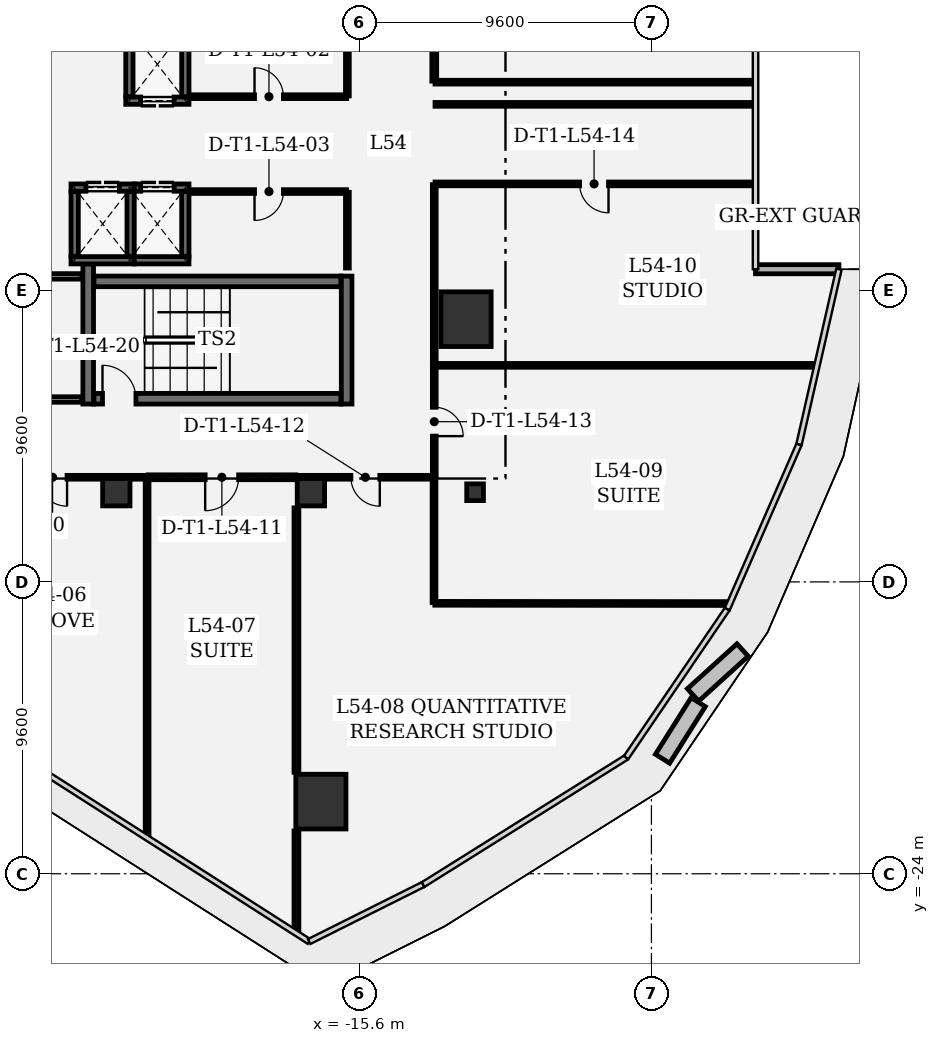
"""IFC4 building model, lengths in metres.
Left out: names, types, materials, properties, quantities, classifications, styles, units other than length and angle.
Written with IfcOpenShell. Run it as: python <this file> out.ifc"""

import sys

from ifc_helpers import new_model, si_unit, direction, frame, frame_2d, origin, origin_2d, place, context, subcontext, project, spatial, rectangle, extrude, element, fill, save


model = new_model("IFC4")
c1 = context("Model", 3, precision=1e-05, world=origin(), true_north=direction((0.0, 1.0)))
c2 = subcontext(c1, "Body", "Model", "MODEL_VIEW")
j1 = project(units=[si_unit("LENGTHUNIT", "METRE"), si_unit("PLANEANGLEUNIT", "RADIAN")], contexts=[c1])
p1 = place(None, origin())
s1 = spatial("IfcSite", under=j1, at=p1, CompositionType="ELEMENT")
p2 = place(p1, origin())
s2 = spatial("IfcBuilding", under=s1, at=p2, CompositionType="ELEMENT")
p3 = place(p2, frame((0.0, 0.0, 233.4)))
s3 = spatial("IfcBuildingStorey", under=s2, at=p3, CompositionType="ELEMENT", Elevation=233.4)
for number, where, z_axis, x_axis in (
    (1, (-16.872, -21.627, 0.0), (0.0, 0.0, 1.0), (1.0, 0.0, 0.0)),
    (2, (-12.097, -5.758, 0.0), (0.0, 0.0, 1.0), (1.0, 0.0, 0.0)),
):
    element("IfcColumn", number, at=place(p3, frame(where, z_axis=z_axis, x_axis=x_axis)), inside=s3, PredefinedType="COLUMN", context=c2, shape_type="SweptSolid", body=[
        extrude(rectangle(XDim=1.65, YDim=1.8, at=origin_2d()), origin(), (0.0, 0.0, 1.0), 4.05),
    ])
for number, where, z_axis, x_axis in (
    (3, (-17.2, -11.45, 0.0), (0.0, 0.0, 1.0), (1.0, 0.0, 0.0)),
    (4, (-23.6, -11.45, 0.0), (0.0, 0.0, 1.0), (1.0, 0.0, 0.0)),
):
    element("IfcColumn", number, at=place(p3, frame(where, z_axis=z_axis, x_axis=x_axis)), inside=s3, PredefinedType="COLUMN", context=c2, shape_type="SweptSolid", body=[
        extrude(rectangle(XDim=0.9, YDim=0.9, at=origin_2d()), origin(), (0.0, 0.0, 1.0), 4.05),
    ])
p4 = place(p3, frame((-11.8, -11.45, 0.0), z_axis=(0.0, 0.0, 1.0), x_axis=(1.0, 0.0, 0.0)))
e5 = element("IfcColumn", 5, at=p4, inside=s3, PredefinedType="COLUMN", context=c2, shape_type="SweptSolid", body=[
    extrude(rectangle(XDim=0.55, YDim=0.55, at=origin_2d()), origin(), (0.0, 0.0, 1.0), 4.05),
])
p5 = place(p3, frame((0.168, -4.115, 0.0), z_axis=(0.0, 0.0, 1.0), x_axis=(-1.0, 0.0, 0.0)))
e6 = element("IfcWall", 6, at=p5, inside=s3, PredefinedType="SOLIDWALL", context=c2, shape_type="SweptSolid", body=[
    extrude(rectangle(XDim=2.743, YDim=0.3, at=frame_2d((1.372, 0.0))), origin(), (0.0, 0.0, 1.0), 3.78),
])
p6 = place(p3, frame((-24.525, -3.94, 0.0), z_axis=(0.0, 0.0, 1.0), x_axis=(0.0, -1.0, 0.0)))
e7 = element("IfcWall", 7, at=p6, inside=s3, PredefinedType="SHEAR", context=c2, shape_type="SweptSolid", body=[
    extrude(rectangle(XDim=4.61, YDim=0.35, at=frame_2d((2.305, 0.0))), origin(), (0.0, 0.0, 1.0), 3.78),
])
p7 = place(p3, frame((-16.025, -8.55, 0.0), z_axis=(0.0, 0.0, 1.0), x_axis=(0.0, 1.0, 0.0)))
e8 = element("IfcWall", 8, at=p7, inside=s3, PredefinedType="SHEAR", context=c2, shape_type="SweptSolid", body=[
    extrude(rectangle(XDim=4.21, YDim=0.35, at=frame_2d((2.105, 0.0))), origin(), (0.0, 0.0, 1.0), 3.78),
])
p8 = place(p3, frame((-24.335, -8.375, 0.0), z_axis=(0.0, 0.0, 1.0), x_axis=(1.0, 0.0, 0.0)))
e9 = element("IfcWall", 9, at=p8, inside=s3, PredefinedType="SHEAR", context=c2, shape_type="SweptSolid", body=[
    extrude(rectangle(XDim=8.12, YDim=0.35, at=frame_2d((4.06, 0.0))), origin(), (0.0, 0.0, 1.0), 3.78),
])
p9 = place(p8, frame((0.28, 0.0, 0.0)))
e10 = element("IfcOpeningElement", 10, at=p9, cuts=e9, PredefinedType="OPENING", context=c2, shape_type="SweptSolid", body=[
    extrude(rectangle(XDim=1.1, YDim=2.2, at=frame_2d((0.55, 1.1))), frame((0.0, 0.185, 0.0), z_axis=(0.0, -1.0, 0.0), x_axis=(1.0, 0.0, 0.0)), (0.0, 0.0, 1.0), 0.37),
])
p10 = place(p3, frame((-16.215, -4.515, 0.0), z_axis=(0.0, 0.0, 1.0), x_axis=(-1.0, 0.0, 0.0)))
e11 = element("IfcWall", 11, at=p10, inside=s3, PredefinedType="SHEAR", context=c2, shape_type="SweptSolid", body=[
    extrude(rectangle(XDim=8.12, YDim=0.35, at=frame_2d((4.06, 0.0))), origin(), (0.0, 0.0, 1.0), 3.78),
])
p11 = place(p3, frame((-21.21, 1.43, 0.0), z_axis=(0.0, 0.0, 1.0), x_axis=(-1.0, 0.0, 0.0)))
e12 = element("IfcWall", 12, at=p11, inside=s3, PredefinedType="SHEAR", context=c2, shape_type="SweptSolid", body=[
    extrude(rectangle(XDim=2.08, YDim=0.24, at=frame_2d((1.04, 0.0))), origin(), (0.0, 0.0, 1.0), 3.78),
])
p12 = place(p11, frame((0.49, 0.0, 0.0)))
e13 = element("IfcOpeningElement", 13, at=p12, cuts=e12, PredefinedType="OPENING", context=c2, shape_type="SweptSolid", body=[
    extrude(rectangle(XDim=1.1, YDim=2.2, at=frame_2d((0.55, 1.1))), frame((0.0, 0.13, 0.0), z_axis=(0.0, -1.0, 0.0), x_axis=(1.0, 0.0, 0.0)), (0.0, 0.0, 1.0), 0.26),
])
for number, where, z_axis, x_axis in (
    (14, (-23.17, 1.562, 0.0), (0.0, 0.0, 1.0), (0.0, 1.0, 0.0)),
    (15, (-21.33, 3.688, 0.0), (0.0, 0.0, 1.0), (0.0, -1.0, 0.0)),
):
    element("IfcWall", number, at=place(p3, frame(where, z_axis=z_axis, x_axis=x_axis)), inside=s3, PredefinedType="SHEAR", context=c2, shape_type="SweptSolid", body=[
        extrude(rectangle(XDim=2.126, YDim=0.24, at=frame_2d((1.063, 0.0))), origin(), (0.0, 0.0, 1.0), 3.78),
    ])
p13 = place(p3, frame((-23.01, -3.82, 0.0), z_axis=(0.0, 0.0, 1.0), x_axis=(-1.0, 0.0, 0.0)))
e16 = element("IfcWall", 16, at=p13, inside=s3, PredefinedType="SHEAR", context=c2, shape_type="SweptSolid", body=[
    extrude(rectangle(XDim=2.08, YDim=0.24, at=frame_2d((1.04, 0.0))), origin(), (0.0, 0.0, 1.0), 3.78),
])
p14 = place(p3, frame((-25.09, -1.43, 0.0), z_axis=(0.0, 0.0, 1.0), x_axis=(1.0, 0.0, 0.0)))
e17 = element("IfcWall", 17, at=p14, inside=s3, PredefinedType="SHEAR", context=c2, shape_type="SweptSolid", body=[
    extrude(rectangle(XDim=2.08, YDim=0.24, at=frame_2d((1.04, 0.0))), origin(), (0.0, 0.0, 1.0), 3.78),
])
p15 = place(p14, frame((0.49, 0.0, 0.0)))
e18 = element("IfcOpeningElement", 18, at=p15, cuts=e17, PredefinedType="OPENING", context=c2, shape_type="SweptSolid", body=[
    extrude(rectangle(XDim=1.1, YDim=2.2, at=frame_2d((0.55, 1.1))), frame((0.0, 0.13, 0.0), z_axis=(0.0, -1.0, 0.0), x_axis=(1.0, 0.0, 0.0)), (0.0, 0.0, 1.0), 0.26),
])
for number, where, z_axis, x_axis in (
    (19, (-24.97, -3.688, 0.0), (0.0, 0.0, 1.0), (0.0, 1.0, 0.0)),
    (20, (-23.13, -1.562, 0.0), (0.0, 0.0, 1.0), (0.0, -1.0, 0.0)),
):
    element("IfcWall", number, at=place(p3, frame(where, z_axis=z_axis, x_axis=x_axis)), inside=s3, PredefinedType="SHEAR", context=c2, shape_type="SweptSolid", body=[
        extrude(rectangle(XDim=2.126, YDim=0.24, at=frame_2d((1.063, 0.0))), origin(), (0.0, 0.0, 1.0), 3.78),
    ])
p16 = place(p3, frame((-21.21, -3.82, 0.0), z_axis=(0.0, 0.0, 1.0), x_axis=(-1.0, 0.0, 0.0)))
e21 = element("IfcWall", 21, at=p16, inside=s3, PredefinedType="SHEAR", context=c2, shape_type="SweptSolid", body=[
    extrude(rectangle(XDim=1.8, YDim=0.24, at=frame_2d((0.9, 0.0))), origin(), (0.0, 0.0, 1.0), 3.78),
])
p17 = place(p3, frame((-23.01, -1.43, 0.0), z_axis=(0.0, 0.0, 1.0), x_axis=(1.0, 0.0, 0.0)))
e22 = element("IfcWall", 22, at=p17, inside=s3, PredefinedType="SHEAR", context=c2, shape_type="SweptSolid", body=[
    extrude(rectangle(XDim=1.8, YDim=0.24, at=frame_2d((0.9, 0.0))), origin(), (0.0, 0.0, 1.0), 3.78),
])
p18 = place(p17, frame((0.21, 0.0, 0.0)))
e23 = element("IfcOpeningElement", 23, at=p18, cuts=e22, PredefinedType="OPENING", context=c2, shape_type="SweptSolid", body=[
    extrude(rectangle(XDim=1.1, YDim=2.2, at=frame_2d((0.55, 1.1))), frame((0.0, 0.13, 0.0), z_axis=(0.0, -1.0, 0.0), x_axis=(1.0, 0.0, 0.0)), (0.0, 0.0, 1.0), 0.26),
])
p19 = place(p3, frame((-21.33, -1.562, 0.0), z_axis=(0.0, 0.0, 1.0), x_axis=(0.0, -1.0, 0.0)))
e24 = element("IfcWall", 24, at=p19, inside=s3, PredefinedType="SHEAR", context=c2, shape_type="SweptSolid", body=[
    extrude(rectangle(XDim=2.126, YDim=0.24, at=frame_2d((1.063, 0.0))), origin(), (0.0, 0.0, 1.0), 3.78),
])
p20 = place(p3, frame((-28.355, -8.4, 0.0), z_axis=(0.0, 0.0, 1.0), x_axis=(1.0, 0.0, 0.0)))
e25 = element("IfcWall", 25, at=p20, inside=s3, PredefinedType="PARTITIONING", context=c2, shape_type="SweptSolid", body=[
    extrude(rectangle(XDim=3.622, YDim=0.18, at=frame_2d((1.811, 0.0))), origin(), (0.0, 0.0, 1.0), 3.78),
])
p21 = place(p20, frame((1.311, 0.0, 0.0)))
e26 = element("IfcOpeningElement", 26, at=p21, cuts=e25, PredefinedType="OPENING", context=c2, shape_type="SweptSolid", body=[
    extrude(rectangle(XDim=1.0, YDim=2.15, at=frame_2d((0.5, 1.075))), frame((0.0, 0.1, 0.0), z_axis=(0.0, -1.0, 0.0), x_axis=(1.0, 0.0, 0.0)), (0.0, 0.0, 1.0), 0.2),
])
p22 = place(p3, frame((-24.733, -4.35, 0.0), z_axis=(0.0, 0.0, 1.0), x_axis=(-1.0, 0.0, 0.0)))
e27 = element("IfcWall", 27, at=p22, inside=s3, PredefinedType="PARTITIONING", context=c2, shape_type="SweptSolid", body=[
    extrude(rectangle(XDim=3.622, YDim=0.18, at=frame_2d((1.811, 0.0))), origin(), (0.0, 0.0, 1.0), 3.78),
])
p23 = place(p3, frame((-21.134, 1.56, 0.0), z_axis=(0.0, 0.0, 1.0), x_axis=(1.0, 0.0, 0.0)))
e28 = element("IfcWall", 28, at=p23, inside=s3, PredefinedType="PARTITIONING", context=c2, shape_type="SweptSolid", body=[
    extrude(rectangle(XDim=5.109, YDim=0.125, at=frame_2d((2.554, 0.0))), origin(), (0.0, 0.0, 1.0), 3.78),
])
p24 = place(p23, frame((2.079, 0.0, 0.0)))
e29 = element("IfcOpeningElement", 29, at=p24, cuts=e28, PredefinedType="OPENING", context=c2, shape_type="SweptSolid", body=[
    extrude(rectangle(XDim=0.95, YDim=2.15, at=frame_2d((0.475, 1.075))), frame((0.0, 0.073, 0.0), z_axis=(0.0, -1.0, 0.0), x_axis=(1.0, 0.0, 0.0)), (0.0, 0.0, 1.0), 0.145),
])
p25 = place(p3, frame((-16.0, 1.585, 0.0), z_axis=(0.0, 0.0, 1.0), x_axis=(0.0, 1.0, 0.0)))
e30 = element("IfcWall", 30, at=p25, inside=s3, PredefinedType="PARTITIONING", context=c2, shape_type="SweptSolid", body=[
    extrude(rectangle(XDim=2.302, YDim=0.125, at=frame_2d((1.151, 0.0))), origin(), (0.0, 0.0, 1.0), 3.78),
])
p26 = place(p3, frame((-16.0, -4.075, 0.0), z_axis=(0.0, 0.0, 1.0), x_axis=(0.0, 1.0, 0.0)))
e31 = element("IfcWall", 31, at=p26, inside=s3, PredefinedType="PARTITIONING", context=c2, shape_type="SweptSolid", body=[
    extrude(rectangle(XDim=2.49, YDim=0.125, at=frame_2d((1.245, 0.0))), origin(), (0.0, 0.0, 1.0), 3.78),
])
p27 = place(p3, frame((-16.025, -1.56, 0.0), z_axis=(0.0, 0.0, 1.0), x_axis=(-1.0, 0.0, 0.0)))
e32 = element("IfcWall", 32, at=p27, inside=s3, PredefinedType="PARTITIONING", context=c2, shape_type="SweptSolid", body=[
    extrude(rectangle(XDim=5.109, YDim=0.125, at=frame_2d((2.554, 0.0))), origin(), (0.0, 0.0, 1.0), 3.78),
])
p28 = place(p27, frame((2.079, 0.0, 0.0)))
e33 = element("IfcOpeningElement", 33, at=p28, cuts=e32, PredefinedType="OPENING", context=c2, shape_type="SweptSolid", body=[
    extrude(rectangle(XDim=0.95, YDim=2.15, at=frame_2d((0.475, 1.075))), frame((0.0, 0.073, 0.0), z_axis=(0.0, -1.0, 0.0), x_axis=(1.0, 0.0, 0.0)), (0.0, 0.0, 1.0), 0.145),
])
p29 = place(p3, frame((-22.612, -10.958, 0.0), z_axis=(0.0, 0.0, 1.0), x_axis=(-1.0, 0.0, 0.0)))
e34 = element("IfcWall", 34, at=p29, inside=s3, PredefinedType="PARTITIONING", context=c2, shape_type="SweptSolid", body=[
    extrude(rectangle(XDim=6.166, YDim=0.125, at=frame_2d((3.083, 0.0))), origin(), (0.0, 0.0, 1.0), 3.78),
])
p30 = place(p29, frame((2.608, 0.0, 0.0)))
e35 = element("IfcOpeningElement", 35, at=p30, cuts=e34, PredefinedType="OPENING", context=c2, shape_type="SweptSolid", body=[
    extrude(rectangle(XDim=0.95, YDim=2.15, at=frame_2d((0.475, 1.075))), frame((0.0, 0.073, 0.0), z_axis=(0.0, -1.0, 0.0), x_axis=(1.0, 0.0, 0.0)), (0.0, 0.0, 1.0), 0.145),
])
p31 = place(p3, frame((-22.587, -22.742, 0.0), z_axis=(0.0, 0.0, 1.0), x_axis=(0.0, 1.0, 0.0)))
e36 = element("IfcWall", 36, at=p31, inside=s3, PredefinedType="PARTITIONING", context=c2, shape_type="SweptSolid", body=[
    extrude(rectangle(XDim=11.76, YDim=0.125, at=frame_2d((5.88, 0.0))), origin(), (0.0, 0.0, 1.0), 2.977),
])
p32 = place(p3, frame((-17.676, -25.881, 0.0), z_axis=(0.0, 0.0, 1.0), x_axis=(0.0, 1.0, 0.0)))
e37 = element("IfcWall", 37, at=p32, inside=s3, PredefinedType="PARTITIONING", context=c2, shape_type="SweptSolid", body=[
    extrude(rectangle(XDim=3.289, YDim=0.16, at=frame_2d((1.645, 0.0))), origin(), (0.0, 0.0, 1.0), 3.78),
])
p33 = place(p3, frame((-17.676, -20.662, 0.0), z_axis=(0.0, 0.0, 1.0), x_axis=(0.0, 1.0, 0.0)))
e38 = element("IfcWall", 38, at=p33, inside=s3, PredefinedType="PARTITIONING", context=c2, shape_type="SweptSolid", body=[
    extrude(rectangle(XDim=8.697, YDim=0.16, at=frame_2d((4.349, 0.0))), origin(), (0.0, 0.0, 1.0), 2.977),
])
p34 = place(p3, frame((-17.701, -10.958, 0.0), z_axis=(0.0, 0.0, 1.0), x_axis=(-1.0, 0.0, 0.0)))
e39 = element("IfcWall", 39, at=p34, inside=s3, PredefinedType="PARTITIONING", context=c2, shape_type="SweptSolid", body=[
    extrude(rectangle(XDim=4.853, YDim=0.16, at=frame_2d((2.427, 0.0))), origin(), (0.0, 0.0, 1.0), 3.344),
])
p35 = place(p34, frame((1.877, 0.0, 0.0)))
e40 = element("IfcOpeningElement", 40, at=p35, cuts=e39, PredefinedType="OPENING", context=c2, shape_type="SweptSolid", body=[
    extrude(rectangle(XDim=1.1, YDim=2.15, at=frame_2d((0.55, 1.075))), frame((0.0, 0.09, 0.0), z_axis=(0.0, -1.0, 0.0), x_axis=(1.0, 0.0, 0.0)), (0.0, 0.0, 1.0), 0.18),
])
p36 = place(p3, frame((-3.506, -15.112, 0.0), z_axis=(0.0, 0.0, 1.0), x_axis=(-0.999999690456, 0.000786821757, 0.0)))
e41 = element("IfcWall", 41, at=p36, inside=s3, PredefinedType="PARTITIONING", context=c2, shape_type="SweptSolid", body=[
    extrude(rectangle(XDim=9.619, YDim=0.125, at=frame_2d((4.81, 0.0))), origin(), (0.0, 0.0, 1.0), 3.78),
])
p37 = place(p3, frame((-13.15, -10.983, 0.0), z_axis=(0.0, 0.0, 1.0), x_axis=(0.0, -1.0, 0.0)))
e42 = element("IfcWall", 42, at=p37, inside=s3, PredefinedType="PARTITIONING", context=c2, shape_type="SweptSolid", body=[
    extrude(rectangle(XDim=4.096, YDim=0.125, at=frame_2d((2.048, 0.0))), origin(), (0.0, 0.0, 1.0), 3.78),
])
p38 = place(p3, frame((-13.175, -10.958, 0.0), z_axis=(0.0, 0.0, 1.0), x_axis=(-1.0, 0.0, 0.0)))
e43 = element("IfcWall", 43, at=p38, inside=s3, PredefinedType="PARTITIONING", context=c2, shape_type="SweptSolid", body=[
    extrude(rectangle(XDim=4.468, YDim=0.125, at=frame_2d((2.234, 0.0))), origin(), (0.0, 0.0, 1.0), 3.344),
])
p39 = place(p38, frame((1.759, 0.0, 0.0)))
e44 = element("IfcOpeningElement", 44, at=p39, cuts=e43, PredefinedType="OPENING", context=c2, shape_type="SweptSolid", body=[
    extrude(rectangle(XDim=0.95, YDim=2.15, at=frame_2d((0.475, 1.075))), frame((0.0, 0.073, 0.0), z_axis=(0.0, -1.0, 0.0), x_axis=(1.0, 0.0, 0.0)), (0.0, 0.0, 1.0), 0.145),
])
p40 = place(p3, frame((-0.632, -7.277, 0.0), z_axis=(0.0, 0.0, 1.0), x_axis=(-1.0, 0.0, 0.0)))
e45 = element("IfcWall", 45, at=p40, inside=s3, PredefinedType="PARTITIONING", context=c2, shape_type="SweptSolid", body=[
    extrude(rectangle(XDim=12.485, YDim=0.125, at=frame_2d((6.242, 0.0))), origin(), (0.0, 0.0, 1.0), 3.78),
])
p41 = place(p3, frame((-13.142, -7.302, 0.0), z_axis=(0.0, 0.0, 1.0), x_axis=(0.0, -1.0, 0.0)))
e46 = element("IfcWall", 46, at=p41, inside=s3, PredefinedType="PARTITIONING", context=c2, shape_type="SweptSolid", body=[
    extrude(rectangle(XDim=3.656, YDim=0.125, at=frame_2d((1.828, 0.0))), origin(), (0.0, 0.0, 1.0), 3.0),
])
p42 = place(p41, frame((1.353, 0.0, 0.0)))
e47 = element("IfcOpeningElement", 47, at=p42, cuts=e46, PredefinedType="OPENING", context=c2, shape_type="SweptSolid", body=[
    extrude(rectangle(XDim=0.95, YDim=2.15, at=frame_2d((0.475, 1.075))), frame((0.0, 0.073, 0.0), z_axis=(0.0, -1.0, 0.0), x_axis=(1.0, 0.0, 0.0)), (0.0, 0.0, 1.0), 0.145),
])
for number, where, z_axis, x_axis in (
    (48, (-2.656, 2.038, 0.0), (0.0, 0.0, 1.0), (-1.0, 0.0, 0.0)),
    (49, (-2.656, 1.308, 0.0), (0.0, 0.0, 1.0), (-1.0, 0.0, 0.0)),
):
    element("IfcWall", number, at=place(p3, frame(where, z_axis=z_axis, x_axis=x_axis)), inside=s3, PredefinedType="PARTITIONING", context=c2, shape_type="SweptSolid", body=[
        extrude(rectangle(XDim=10.462, YDim=0.125, at=frame_2d((5.231, 0.0))), origin(), (0.0, 0.0, 1.0), 3.78),
    ])
p43 = place(p3, frame((-2.656, -1.308, 0.0), z_axis=(0.0, 0.0, 1.0), x_axis=(-1.0, 0.0, 0.0)))
e50 = element("IfcWall", 50, at=p43, inside=s3, PredefinedType="PARTITIONING", context=c2, shape_type="SweptSolid", body=[
    extrude(rectangle(XDim=10.462, YDim=0.125, at=frame_2d((5.231, 0.0))), origin(), (0.0, 0.0, 1.0), 3.78),
])
p44 = place(p43, frame((4.756, 0.0, 0.0)))
e51 = element("IfcOpeningElement", 51, at=p44, cuts=e50, PredefinedType="OPENING", context=c2, shape_type="SweptSolid", body=[
    extrude(rectangle(XDim=0.95, YDim=2.15, at=frame_2d((0.475, 1.075))), frame((0.0, 0.073, 0.0), z_axis=(0.0, -1.0, 0.0), x_axis=(1.0, 0.0, 0.0)), (0.0, 0.0, 1.0), 0.145),
])
p45 = place(p3, frame((-13.142, -1.333, 0.0), z_axis=(0.0, 0.0, 1.0), x_axis=(0.0, -1.0, 0.0)))
e52 = element("IfcWall", 52, at=p45, inside=s3, PredefinedType="PARTITIONING", context=c2, shape_type="SweptSolid", body=[
    extrude(rectangle(XDim=5.911, YDim=0.125, at=frame_2d((2.955, 0.0))), origin(), (0.0, 0.0, 1.0), 3.78),
])
p46 = place(p3, frame((-13.142, 10.758, 0.0), z_axis=(0.0, 0.0, 1.0), x_axis=(0.0, -1.0, 0.0)))
e53 = element("IfcWall", 53, at=p46, inside=s3, PredefinedType="PARTITIONING", context=c2, shape_type="SweptSolid", body=[
    extrude(rectangle(XDim=8.687, YDim=0.16, at=frame_2d((4.344, 0.0))), origin(), (0.0, 0.0, 1.0), 3.0),
])
p47 = place(p46, frame((2.71, 0.0, 0.0)))
e54 = element("IfcOpeningElement", 54, at=p47, cuts=e53, PredefinedType="OPENING", context=c2, shape_type="SweptSolid", body=[
    extrude(rectangle(XDim=1.1, YDim=2.15, at=frame_2d((0.55, 1.075))), frame((0.0, 0.09, 0.0), z_axis=(0.0, -1.0, 0.0), x_axis=(1.0, 0.0, 0.0)), (0.0, 0.0, 1.0), 0.18),
])
p48 = place(p9, origin())
e55 = element("IfcDoor", 55, at=p48, inside=s3, OperationType="SINGLE_SWING_LEFT", PredefinedType="DOOR", context=c2, shape_type="SweptSolid", body=[
    extrude(rectangle(XDim=1.1, YDim=2.2, at=frame_2d((0.55, 1.1))), frame((0.0, 0.025, 0.0), z_axis=(0.0, -1.0, 0.0), x_axis=(1.0, 0.0, 0.0)), (0.0, 0.0, 1.0), 0.05),
])
fill(e10, e55)
p49 = place(p12, origin())
e56 = element("IfcDoor", 56, at=p49, inside=s3, OperationType="DOUBLE_DOOR_SLIDING", PredefinedType="DOOR", context=c2, shape_type="SweptSolid", body=[
    extrude(rectangle(XDim=1.1, YDim=2.2, at=frame_2d((0.55, 1.1))), frame((0.0, 0.025, 0.0), z_axis=(0.0, -1.0, 0.0), x_axis=(1.0, 0.0, 0.0)), (0.0, 0.0, 1.0), 0.05),
])
fill(e13, e56)
p50 = place(p15, origin())
e57 = element("IfcDoor", 57, at=p50, inside=s3, OperationType="DOUBLE_DOOR_SLIDING", PredefinedType="DOOR", context=c2, shape_type="SweptSolid", body=[
    extrude(rectangle(XDim=1.1, YDim=2.2, at=frame_2d((0.55, 1.1))), frame((0.0, 0.025, 0.0), z_axis=(0.0, -1.0, 0.0), x_axis=(1.0, 0.0, 0.0)), (0.0, 0.0, 1.0), 0.05),
])
fill(e18, e57)
p51 = place(p18, origin())
e58 = element("IfcDoor", 58, at=p51, inside=s3, OperationType="DOUBLE_DOOR_SLIDING", PredefinedType="DOOR", context=c2, shape_type="SweptSolid", body=[
    extrude(rectangle(XDim=1.1, YDim=2.2, at=frame_2d((0.55, 1.1))), frame((0.0, 0.025, 0.0), z_axis=(0.0, -1.0, 0.0), x_axis=(1.0, 0.0, 0.0)), (0.0, 0.0, 1.0), 0.05),
])
fill(e23, e58)
p52 = place(p24, origin())
e59 = element("IfcDoor", 59, at=p52, inside=s3, OperationType="SINGLE_SWING_LEFT", PredefinedType="DOOR", context=c2, shape_type="SweptSolid", body=[
    extrude(rectangle(XDim=0.95, YDim=2.15, at=frame_2d((0.475, 1.075))), frame((0.0, 0.025, 0.0), z_axis=(0.0, -1.0, 0.0), x_axis=(1.0, 0.0, 0.0)), (0.0, 0.0, 1.0), 0.05),
])
fill(e29, e59)
p53 = place(p28, origin())
e60 = element("IfcDoor", 60, at=p53, inside=s3, OperationType="SINGLE_SWING_RIGHT", PredefinedType="DOOR", context=c2, shape_type="SweptSolid", body=[
    extrude(rectangle(XDim=0.95, YDim=2.15, at=frame_2d((0.475, 1.075))), frame((0.0, 0.025, 0.0), z_axis=(0.0, -1.0, 0.0), x_axis=(1.0, 0.0, 0.0)), (0.0, 0.0, 1.0), 0.05),
])
fill(e33, e60)
p54 = place(p30, origin())
e61 = element("IfcDoor", 61, at=p54, inside=s3, OperationType="SINGLE_SWING_LEFT", PredefinedType="DOOR", context=c2, shape_type="SweptSolid", body=[
    extrude(rectangle(XDim=0.95, YDim=2.15, at=frame_2d((0.475, 1.075))), frame((0.0, 0.025, 0.0), z_axis=(0.0, -1.0, 0.0), x_axis=(1.0, 0.0, 0.0)), (0.0, 0.0, 1.0), 0.05),
])
fill(e35, e61)
p55 = place(p35, origin())
e62 = element("IfcDoor", 62, at=p55, inside=s3, OperationType="SINGLE_SWING_RIGHT", PredefinedType="DOOR", context=c2, shape_type="SweptSolid", body=[
    extrude(rectangle(XDim=1.1, YDim=2.15, at=frame_2d((0.55, 1.075))), frame((0.0, 0.025, 0.0), z_axis=(0.0, -1.0, 0.0), x_axis=(1.0, 0.0, 0.0)), (0.0, 0.0, 1.0), 0.05),
])
fill(e40, e62)
p56 = place(p39, origin())
e63 = element("IfcDoor", 63, at=p56, inside=s3, OperationType="SINGLE_SWING_LEFT", PredefinedType="DOOR", context=c2, shape_type="SweptSolid", body=[
    extrude(rectangle(XDim=0.95, YDim=2.15, at=frame_2d((0.475, 1.075))), frame((0.0, 0.025, 0.0), z_axis=(0.0, -1.0, 0.0), x_axis=(1.0, 0.0, 0.0)), (0.0, 0.0, 1.0), 0.05),
])
fill(e44, e63)
p57 = place(p42, origin())
e64 = element("IfcDoor", 64, at=p57, inside=s3, OperationType="SINGLE_SWING_RIGHT", PredefinedType="DOOR", context=c2, shape_type="SweptSolid", body=[
    extrude(rectangle(XDim=0.95, YDim=2.15, at=frame_2d((0.475, 1.075))), frame((0.0, 0.025, 0.0), z_axis=(0.0, -1.0, 0.0), x_axis=(1.0, 0.0, 0.0)), (0.0, 0.0, 1.0), 0.05),
])
fill(e47, e64)
p58 = place(p44, origin())
e65 = element("IfcDoor", 65, at=p58, inside=s3, OperationType="SINGLE_SWING_LEFT", PredefinedType="DOOR", context=c2, shape_type="SweptSolid", body=[
    extrude(rectangle(XDim=0.95, YDim=2.15, at=frame_2d((0.475, 1.075))), frame((0.0, 0.025, 0.0), z_axis=(0.0, -1.0, 0.0), x_axis=(1.0, 0.0, 0.0)), (0.0, 0.0, 1.0), 0.05),
])
fill(e51, e65)
save(model, sys.argv[1])
